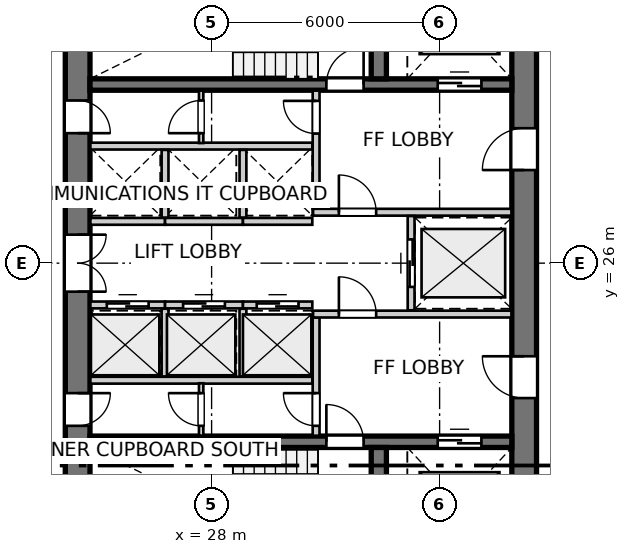
"""IFC4 building model, lengths in metres.
Left out: names, types, materials, properties, quantities, classifications, styles, units other than length and angle.
Written with IfcOpenShell. Run it as: python <this file> out.ifc"""

import sys

from ifc_helpers import new_model, si_unit, direction, frame, frame_2d, origin, place, context, subcontext, project, spatial, rectangle, extrude, source, transform, mapped, element, fill, save


model = new_model("IFC4")
c1 = context("Model", 3, precision=1e-05, world=origin(), true_north=direction((0.0, 1.0)))
c2 = subcontext(c1, "Body", "Model", "MODEL_VIEW")
j1 = project(units=[si_unit("LENGTHUNIT", "METRE"), si_unit("PLANEANGLEUNIT", "RADIAN")], contexts=[c1])
p1 = place(None, origin())
s1 = spatial("IfcSite", under=j1, at=p1, CompositionType="ELEMENT")
p2 = place(p1, origin())
s2 = spatial("IfcBuilding", under=s1, at=p2, CompositionType="ELEMENT")
p3 = place(p2, frame((0.0, 0.0, 112.0)))
s3 = spatial("IfcBuildingStorey", under=s2, at=p3, CompositionType="ELEMENT", Elevation=112.0)
p4 = place(p3, frame((24.475, 33.8, 0.0), z_axis=(0.0, 0.0, 1.0), x_axis=(0.0, -1.0, 0.0)))
e1 = element("IfcWall", 1, at=p4, inside=s3, PredefinedType="SHEAR", context=c2, shape_type="SweptSolid", body=[
    extrude(rectangle(XDim=15.6, YDim=0.65, at=frame_2d((7.8, 0.0))), origin(), (0.0, 0.0, 1.0), 2.935),
])
p5 = place(p4, frame((7.05, 0.0, 0.0)))
e2 = element("IfcOpeningElement", 2, at=p5, cuts=e1, PredefinedType="OPENING", context=c2, shape_type="SweptSolid", body=[
    extrude(rectangle(XDim=1.5, YDim=2.15, at=frame_2d((0.75, 1.075))), frame((0.0, 0.335, 0.0), z_axis=(0.0, -1.0, 0.0), x_axis=(1.0, 0.0, 0.0)), (0.0, 0.0, 1.0), 0.67),
])
p6 = place(p4, frame((3.52, 0.0, 0.0)))
e3 = element("IfcOpeningElement", 3, at=p6, cuts=e1, PredefinedType="OPENING", context=c2, shape_type="SweptSolid", body=[
    extrude(rectangle(XDim=0.86, YDim=2.05, at=frame_2d((0.43, 1.025))), frame((0.0, 0.335, 0.0), z_axis=(0.0, -1.0, 0.0), x_axis=(1.0, 0.0, 0.0)), (0.0, 0.0, 1.0), 0.67),
])
p7 = place(p4, frame((11.22, 0.0, 0.0)))
e4 = element("IfcOpeningElement", 4, at=p7, cuts=e1, PredefinedType="OPENING", context=c2, shape_type="SweptSolid", body=[
    extrude(rectangle(XDim=0.86, YDim=2.05, at=frame_2d((0.43, 1.025))), frame((0.0, 0.335, 0.0), z_axis=(0.0, -1.0, 0.0), x_axis=(1.0, 0.0, 0.0)), (0.0, 0.0, 1.0), 0.67),
])
p8 = place(p3, frame((36.225, 18.2, 0.0), z_axis=(0.0, 0.0, 1.0), x_axis=(0.0, 1.0, 0.0)))
e5 = element("IfcWall", 5, at=p8, inside=s3, PredefinedType="SHEAR", context=c2, shape_type="SweptSolid", body=[
    extrude(rectangle(XDim=15.6, YDim=0.65, at=frame_2d((7.8, 0.0))), origin(), (0.0, 0.0, 1.0), 2.935),
])
p9 = place(p8, frame((4.25, 0.0, 0.0)))
e6 = element("IfcOpeningElement", 6, at=p9, cuts=e5, PredefinedType="OPENING", context=c2, shape_type="SweptSolid", body=[
    extrude(rectangle(XDim=1.1, YDim=2.15, at=frame_2d((0.55, 1.075))), frame((0.0, 0.335, 0.0), z_axis=(0.0, -1.0, 0.0), x_axis=(1.0, 0.0, 0.0)), (0.0, 0.0, 1.0), 0.67),
])
p10 = place(p8, frame((10.25, 0.0, 0.0)))
e7 = element("IfcOpeningElement", 7, at=p10, cuts=e5, PredefinedType="OPENING", context=c2, shape_type="SweptSolid", body=[
    extrude(rectangle(XDim=1.1, YDim=2.15, at=frame_2d((0.55, 1.075))), frame((0.0, 0.335, 0.0), z_axis=(0.0, -1.0, 0.0), x_axis=(1.0, 0.0, 0.0)), (0.0, 0.0, 1.0), 0.67),
])
p11 = place(p3, frame((24.8, 21.3, 0.0), z_axis=(0.0, 0.0, 1.0), x_axis=(1.0, 0.0, 0.0)))
e8 = element("IfcWall", 8, at=p11, inside=s3, PredefinedType="SHEAR", context=c2, shape_type="SweptSolid", body=[
    extrude(rectangle(XDim=11.1, YDim=0.3, at=frame_2d((5.55, 0.0))), origin(), (0.0, 0.0, 1.0), 2.935),
])
p12 = place(p11, frame((6.22, 0.0, 0.0)))
e9 = element("IfcOpeningElement", 9, at=p12, cuts=e8, PredefinedType="OPENING", context=c2, shape_type="SweptSolid", body=[
    extrude(rectangle(XDim=0.98, YDim=2.15, at=frame_2d((0.49, 1.075))), frame((0.0, 0.16, 0.0), z_axis=(0.0, -1.0, 0.0), x_axis=(1.0, 0.0, 0.0)), (0.0, 0.0, 1.0), 0.32),
])
p13 = place(p11, frame((9.15, 0.0, 0.0)))
e10 = element("IfcOpeningElement", 10, at=p13, cuts=e8, PredefinedType="OPENING", context=c2, shape_type="SweptSolid", body=[
    extrude(rectangle(XDim=1.15, YDim=2.15, at=frame_2d((0.575, 1.075))), frame((0.0, 0.16, 0.0), z_axis=(0.0, -1.0, 0.0), x_axis=(1.0, 0.0, 0.0)), (0.0, 0.0, 1.0), 0.32),
])
p14 = place(p3, frame((32.4, 18.2, 0.0), z_axis=(0.0, 0.0, 1.0), x_axis=(0.0, 1.0, 0.0)))
e11 = element("IfcWall", 11, at=p14, inside=s3, PredefinedType="SHEAR", context=c2, shape_type="SweptSolid", body=[
    extrude(rectangle(XDim=2.95, YDim=0.4, at=frame_2d((1.475, 0.0))), origin(), (0.0, 0.0, 1.0), 2.935),
])
p15 = place(p3, frame((24.8, 30.7, 0.0), z_axis=(0.0, 0.0, 1.0), x_axis=(1.0, 0.0, 0.0)))
e12 = element("IfcWall", 12, at=p15, inside=s3, PredefinedType="SHEAR", context=c2, shape_type="SweptSolid", body=[
    extrude(rectangle(XDim=11.1, YDim=0.3, at=frame_2d((5.55, 0.0))), origin(), (0.0, 0.0, 1.0), 2.935),
])
p16 = place(p15, frame((6.22, 0.0, 0.0)))
e13 = element("IfcOpeningElement", 13, at=p16, cuts=e12, PredefinedType="OPENING", context=c2, shape_type="SweptSolid", body=[
    extrude(rectangle(XDim=0.98, YDim=2.15, at=frame_2d((0.49, 1.075))), frame((0.0, 0.16, 0.0), z_axis=(0.0, -1.0, 0.0), x_axis=(1.0, 0.0, 0.0)), (0.0, 0.0, 1.0), 0.32),
])
p17 = place(p15, frame((9.15, 0.0, 0.0)))
e14 = element("IfcOpeningElement", 14, at=p17, cuts=e12, PredefinedType="OPENING", context=c2, shape_type="SweptSolid", body=[
    extrude(rectangle(XDim=1.15, YDim=2.15, at=frame_2d((0.575, 1.075))), frame((0.0, 0.16, 0.0), z_axis=(0.0, -1.0, 0.0), x_axis=(1.0, 0.0, 0.0)), (0.0, 0.0, 1.0), 0.32),
])
p18 = place(p3, frame((32.4, 30.85, 0.0), z_axis=(0.0, 0.0, 1.0), x_axis=(0.0, 1.0, 0.0)))
e15 = element("IfcWall", 15, at=p18, inside=s3, PredefinedType="SHEAR", context=c2, shape_type="SweptSolid", body=[
    extrude(rectangle(XDim=2.95, YDim=0.4, at=frame_2d((1.475, 0.0))), origin(), (0.0, 0.0, 1.0), 2.935),
])
p19 = place(p3, frame((30.75, 21.46, 0.0), z_axis=(0.0, 0.0, 1.0), x_axis=(0.0, 1.0, 0.0)))
e16 = element("IfcWall", 16, at=p19, inside=s3, PredefinedType="PARTITIONING", context=c2, shape_type="SweptSolid", body=[
    extrude(rectangle(XDim=3.11, YDim=0.18, at=frame_2d((1.555, 0.0))), origin(), (0.0, 0.0, 1.0), 2.935),
])
p20 = place(p19, frame((0.26, 0.0, 0.0)))
e17 = element("IfcOpeningElement", 17, at=p20, cuts=e16, PredefinedType="OPENING", context=c2, shape_type="SweptSolid", body=[
    extrude(rectangle(XDim=0.86, YDim=2.05, at=frame_2d((0.43, 1.025))), frame((0.0, 0.1, 0.0), z_axis=(0.0, -1.0, 0.0), x_axis=(1.0, 0.0, 0.0)), (0.0, 0.0, 1.0), 0.2),
])
p21 = place(p3, frame((30.67, 24.66, 0.0), z_axis=(0.0, 0.0, 1.0), x_axis=(1.0, 0.0, 0.0)))
e18 = element("IfcWall", 18, at=p21, inside=s3, PredefinedType="PARTITIONING", context=c2, shape_type="SweptSolid", body=[
    extrude(rectangle(XDim=5.22, YDim=0.18, at=frame_2d((2.61, 0.0))), origin(), (0.0, 0.0, 1.0), 2.935),
])
p22 = place(p21, frame((0.68, 0.0, 0.0)))
e19 = element("IfcOpeningElement", 19, at=p22, cuts=e18, PredefinedType="OPENING", context=c2, shape_type="SweptSolid", body=[
    extrude(rectangle(XDim=0.98, YDim=2.15, at=frame_2d((0.49, 1.075))), frame((0.0, 0.1, 0.0), z_axis=(0.0, -1.0, 0.0), x_axis=(1.0, 0.0, 0.0)), (0.0, 0.0, 1.0), 0.2),
])
p23 = place(p3, frame((30.75, 27.43, 0.0), z_axis=(0.0, 0.0, 1.0), x_axis=(0.0, 1.0, 0.0)))
e20 = element("IfcWall", 20, at=p23, inside=s3, PredefinedType="PARTITIONING", context=c2, shape_type="SweptSolid", body=[
    extrude(rectangle(XDim=3.11, YDim=0.18, at=frame_2d((1.555, 0.0))), origin(), (0.0, 0.0, 1.0), 2.935),
])
p24 = place(p23, frame((1.98, 0.0, 0.0)))
e21 = element("IfcOpeningElement", 21, at=p24, cuts=e20, PredefinedType="OPENING", context=c2, shape_type="SweptSolid", body=[
    extrude(rectangle(XDim=0.86, YDim=2.05, at=frame_2d((0.43, 1.025))), frame((0.0, 0.1, 0.0), z_axis=(0.0, -1.0, 0.0), x_axis=(1.0, 0.0, 0.0)), (0.0, 0.0, 1.0), 0.2),
])
p25 = place(p3, frame((30.67, 27.34, 0.0), z_axis=(0.0, 0.0, 1.0), x_axis=(1.0, 0.0, 0.0)))
e22 = element("IfcWall", 22, at=p25, inside=s3, PredefinedType="PARTITIONING", context=c2, shape_type="SweptSolid", body=[
    extrude(rectangle(XDim=5.22, YDim=0.18, at=frame_2d((2.61, 0.0))), origin(), (0.0, 0.0, 1.0), 2.935),
])
p26 = place(p25, frame((0.68, 0.0, 0.0)))
e23 = element("IfcOpeningElement", 23, at=p26, cuts=e22, PredefinedType="OPENING", context=c2, shape_type="SweptSolid", body=[
    extrude(rectangle(XDim=0.98, YDim=2.15, at=frame_2d((0.49, 1.075))), frame((0.0, 0.1, 0.0), z_axis=(0.0, -1.0, 0.0), x_axis=(1.0, 0.0, 0.0)), (0.0, 0.0, 1.0), 0.2),
])
p27 = place(p3, frame((33.25, 24.76, 0.0), z_axis=(0.0, 0.0, 1.0), x_axis=(0.0, 1.0, 0.0)))
e24 = element("IfcWall", 24, at=p27, inside=s3, PredefinedType="PARTITIONING", context=c2, shape_type="SweptSolid", body=[
    extrude(rectangle(XDim=2.48, YDim=0.18, at=frame_2d((1.24, 0.0))), origin(), (0.0, 0.0, 1.0), 2.935),
])
p28 = place(p27, frame((0.615, 0.0, 0.0)))
e25 = element("IfcOpeningElement", 25, at=p28, cuts=e24, PredefinedType="OPENING", context=c2, shape_type="SweptSolid", body=[
    extrude(rectangle(XDim=1.25, YDim=2.15, at=frame_2d((0.625, 1.075))), frame((0.0, 0.1, 0.0), z_axis=(0.0, -1.0, 0.0), x_axis=(1.0, 0.0, 0.0)), (0.0, 0.0, 1.0), 0.2),
])
p29 = place(p3, frame((24.81, 22.92, 0.0), z_axis=(0.0, 0.0, 1.0), x_axis=(1.0, 0.0, 0.0)))
e26 = element("IfcWall", 26, at=p29, inside=s3, PredefinedType="PARTITIONING", context=c2, shape_type="SweptSolid", body=[
    extrude(rectangle(XDim=5.84, YDim=0.18, at=frame_2d((2.92, 0.0))), origin(), (0.0, 0.0, 1.0), 2.935),
])
p30 = place(p3, frame((24.81, 24.9, 0.0), z_axis=(0.0, 0.0, 1.0), x_axis=(1.0, 0.0, 0.0)))
e27 = element("IfcWall", 27, at=p30, inside=s3, PredefinedType="PARTITIONING", context=c2, shape_type="SweptSolid", body=[
    extrude(rectangle(XDim=1.965, YDim=0.18, at=frame_2d((0.982, 0.0))), origin(), (0.0, 0.0, 1.0), 2.935),
])
p31 = place(p30, frame((0.433, 0.0, 0.0)))
e28 = element("IfcOpeningElement", 28, at=p31, cuts=e27, PredefinedType="OPENING", context=c2, shape_type="SweptSolid", body=[
    extrude(rectangle(XDim=1.1, YDim=2.15, at=frame_2d((0.55, 1.075))), frame((0.0, 0.1, 0.0), z_axis=(0.0, -1.0, 0.0), x_axis=(1.0, 0.0, 0.0)), (0.0, 0.0, 1.0), 0.2),
])
p32 = place(p3, frame((26.775, 24.9, 0.0), z_axis=(0.0, 0.0, 1.0), x_axis=(1.0, 0.0, 0.0)))
e29 = element("IfcWall", 29, at=p32, inside=s3, PredefinedType="PARTITIONING", context=c2, shape_type="SweptSolid", body=[
    extrude(rectangle(XDim=2.05, YDim=0.18, at=frame_2d((1.025, 0.0))), origin(), (0.0, 0.0, 1.0), 2.935),
])
p33 = place(p32, frame((0.475, 0.0, 0.0)))
e30 = element("IfcOpeningElement", 30, at=p33, cuts=e29, PredefinedType="OPENING", context=c2, shape_type="SweptSolid", body=[
    extrude(rectangle(XDim=1.1, YDim=2.15, at=frame_2d((0.55, 1.075))), frame((0.0, 0.1, 0.0), z_axis=(0.0, -1.0, 0.0), x_axis=(1.0, 0.0, 0.0)), (0.0, 0.0, 1.0), 0.2),
])
p34 = place(p3, frame((26.775, 23.02, 0.0), z_axis=(0.0, 0.0, 1.0), x_axis=(0.0, 1.0, 0.0)))
e31 = element("IfcWall", 31, at=p34, inside=s3, PredefinedType="PARTITIONING", context=c2, shape_type="SweptSolid", body=[
    extrude(rectangle(XDim=1.78, YDim=0.18, at=frame_2d((0.89, 0.0))), origin(), (0.0, 0.0, 1.0), 2.935),
])
p35 = place(p3, frame((28.825, 24.9, 0.0), z_axis=(0.0, 0.0, 1.0), x_axis=(1.0, 0.0, 0.0)))
e32 = element("IfcWall", 32, at=p35, inside=s3, PredefinedType="PARTITIONING", context=c2, shape_type="SweptSolid", body=[
    extrude(rectangle(XDim=1.825, YDim=0.18, at=frame_2d((0.913, 0.0))), origin(), (0.0, 0.0, 1.0), 2.935),
])
p36 = place(p35, frame((0.363, 0.0, 0.0)))
e33 = element("IfcOpeningElement", 33, at=p36, cuts=e32, PredefinedType="OPENING", context=c2, shape_type="SweptSolid", body=[
    extrude(rectangle(XDim=1.1, YDim=2.15, at=frame_2d((0.55, 1.075))), frame((0.0, 0.1, 0.0), z_axis=(0.0, -1.0, 0.0), x_axis=(1.0, 0.0, 0.0)), (0.0, 0.0, 1.0), 0.2),
])
p37 = place(p3, frame((28.825, 23.02, 0.0), z_axis=(0.0, 0.0, 1.0), x_axis=(0.0, 1.0, 0.0)))
e34 = element("IfcWall", 34, at=p37, inside=s3, PredefinedType="PARTITIONING", context=c2, shape_type="SweptSolid", body=[
    extrude(rectangle(XDim=1.78, YDim=0.18, at=frame_2d((0.89, 0.0))), origin(), (0.0, 0.0, 1.0), 2.935),
])
p38 = place(p3, frame((24.81, 29.08, 0.0), z_axis=(0.0, 0.0, 1.0), x_axis=(1.0, 0.0, 0.0)))
e35 = element("IfcWall", 35, at=p38, inside=s3, PredefinedType="PARTITIONING", context=c2, shape_type="SweptSolid", body=[
    extrude(rectangle(XDim=5.84, YDim=0.18, at=frame_2d((2.92, 0.0))), origin(), (0.0, 0.0, 1.0), 2.935),
])
p39 = place(p3, frame((24.81, 27.1, 0.0), z_axis=(0.0, 0.0, 1.0), x_axis=(1.0, 0.0, 0.0)))
e36 = element("IfcWall", 36, at=p39, inside=s3, PredefinedType="PARTITIONING", context=c2, shape_type="SweptSolid", body=[
    extrude(rectangle(XDim=1.965, YDim=0.18, at=frame_2d((0.982, 0.0))), origin(), (0.0, 0.0, 1.0), 2.935),
])
p40 = place(p3, frame((26.775, 27.1, 0.0), z_axis=(0.0, 0.0, 1.0), x_axis=(1.0, 0.0, 0.0)))
e37 = element("IfcWall", 37, at=p40, inside=s3, PredefinedType="PARTITIONING", context=c2, shape_type="SweptSolid", body=[
    extrude(rectangle(XDim=2.05, YDim=0.18, at=frame_2d((1.025, 0.0))), origin(), (0.0, 0.0, 1.0), 2.935),
])
p41 = place(p3, frame((26.775, 27.2, 0.0), z_axis=(0.0, 0.0, 1.0), x_axis=(0.0, 1.0, 0.0)))
e38 = element("IfcWall", 38, at=p41, inside=s3, PredefinedType="PARTITIONING", context=c2, shape_type="SweptSolid", body=[
    extrude(rectangle(XDim=1.78, YDim=0.18, at=frame_2d((0.89, 0.0))), origin(), (0.0, 0.0, 1.0), 2.935),
])
p42 = place(p3, frame((28.825, 27.1, 0.0), z_axis=(0.0, 0.0, 1.0), x_axis=(1.0, 0.0, 0.0)))
e39 = element("IfcWall", 39, at=p42, inside=s3, PredefinedType="PARTITIONING", context=c2, shape_type="SweptSolid", body=[
    extrude(rectangle(XDim=1.825, YDim=0.18, at=frame_2d((0.913, 0.0))), origin(), (0.0, 0.0, 1.0), 2.935),
])
p43 = place(p3, frame((28.825, 27.2, 0.0), z_axis=(0.0, 0.0, 1.0), x_axis=(0.0, 1.0, 0.0)))
e40 = element("IfcWall", 40, at=p43, inside=s3, PredefinedType="PARTITIONING", context=c2, shape_type="SweptSolid", body=[
    extrude(rectangle(XDim=1.78, YDim=0.18, at=frame_2d((0.89, 0.0))), origin(), (0.0, 0.0, 1.0), 2.935),
])
p44 = place(p3, frame((27.725, 21.46, 0.0), z_axis=(0.0, 0.0, 1.0), x_axis=(0.0, 1.0, 0.0)))
e41 = element("IfcWall", 41, at=p44, inside=s3, PredefinedType="PARTITIONING", context=c2, shape_type="SweptSolid", body=[
    extrude(rectangle(XDim=1.38, YDim=0.115, at=frame_2d((0.69, 0.0))), origin(), (0.0, 0.0, 1.0), 2.935),
])
p45 = place(p44, frame((0.26, 0.0, 0.0)))
e42 = element("IfcOpeningElement", 42, at=p45, cuts=e41, PredefinedType="OPENING", context=c2, shape_type="SweptSolid", body=[
    extrude(rectangle(XDim=0.86, YDim=2.05, at=frame_2d((0.43, 1.025))), frame((0.0, 0.067, 0.0), z_axis=(0.0, -1.0, 0.0), x_axis=(1.0, 0.0, 0.0)), (0.0, 0.0, 1.0), 0.135),
])
p46 = place(p3, frame((27.725, 29.16, 0.0), z_axis=(0.0, 0.0, 1.0), x_axis=(0.0, 1.0, 0.0)))
e43 = element("IfcWall", 43, at=p46, inside=s3, PredefinedType="PARTITIONING", context=c2, shape_type="SweptSolid", body=[
    extrude(rectangle(XDim=1.38, YDim=0.115, at=frame_2d((0.69, 0.0))), origin(), (0.0, 0.0, 1.0), 2.935),
])
p47 = place(p46, frame((0.26, 0.0, 0.0)))
e44 = element("IfcOpeningElement", 44, at=p47, cuts=e43, PredefinedType="OPENING", context=c2, shape_type="SweptSolid", body=[
    extrude(rectangle(XDim=0.86, YDim=2.05, at=frame_2d((0.43, 1.025))), frame((0.0, 0.067, 0.0), z_axis=(0.0, -1.0, 0.0), x_axis=(1.0, 0.0, 0.0)), (0.0, 0.0, 1.0), 0.135),
])
m1 = source(origin(), c2, "Body", "SweptSolid", [
    extrude(rectangle(XDim=0.98, YDim=2.15, at=frame_2d((0.49, 1.075))), frame((0.0, 0.025, 0.0), z_axis=(0.0, -1.0, 0.0), x_axis=(1.0, 0.0, 0.0)), (0.0, 0.0, 1.0), 0.05),
])
p48 = place(p12, origin())
e45 = element("IfcDoor", 45, at=p48, inside=s3, OperationType="SINGLE_SWING_LEFT", PredefinedType="DOOR", context=c2, shape_type="MappedRepresentation", body=[
    mapped(m1, transform((0.0, 0.0, 0.0), x_axis=(1.0, 0.0, 0.0), y_axis=(0.0, 1.0, 0.0), z_axis=(0.0, 0.0, 1.0), scale=1.0)),
])
fill(e9, e45)
m2 = source(origin(), c2, "Body", "SweptSolid", [
    extrude(rectangle(XDim=1.15, YDim=2.15, at=frame_2d((0.575, 1.075))), frame((0.0, 0.025, 0.0), z_axis=(0.0, -1.0, 0.0), x_axis=(1.0, 0.0, 0.0)), (0.0, 0.0, 1.0), 0.05),
])
p49 = place(p13, origin())
e46 = element("IfcDoor", 46, at=p49, inside=s3, OperationType="DOUBLE_DOOR_SLIDING", PredefinedType="DOOR", context=c2, shape_type="MappedRepresentation", body=[
    mapped(m2, transform((0.0, 0.0, 0.0), x_axis=(1.0, 0.0, 0.0), y_axis=(0.0, 1.0, 0.0), z_axis=(0.0, 0.0, 1.0), scale=1.0)),
])
fill(e10, e46)
p50 = place(p16, origin())
e47 = element("IfcDoor", 47, at=p50, inside=s3, OperationType="SINGLE_SWING_RIGHT", PredefinedType="DOOR", context=c2, shape_type="MappedRepresentation", body=[
    mapped(m1, transform((0.0, 0.0, 0.0), x_axis=(1.0, 0.0, 0.0), y_axis=(0.0, 1.0, 0.0), z_axis=(0.0, 0.0, 1.0), scale=1.0)),
])
fill(e13, e47)
p51 = place(p17, origin())
e48 = element("IfcDoor", 48, at=p51, inside=s3, OperationType="DOUBLE_DOOR_SLIDING", PredefinedType="DOOR", context=c2, shape_type="MappedRepresentation", body=[
    mapped(m2, transform((0.0, 0.0, 0.0), x_axis=(1.0, 0.0, 0.0), y_axis=(0.0, 1.0, 0.0), z_axis=(0.0, 0.0, 1.0), scale=1.0)),
])
fill(e14, e48)
m3 = source(origin(), c2, "Body", "SweptSolid", [
    extrude(rectangle(XDim=1.1, YDim=2.15, at=frame_2d((0.55, 1.075))), frame((0.0, 0.025, 0.0), z_axis=(0.0, -1.0, 0.0), x_axis=(1.0, 0.0, 0.0)), (0.0, 0.0, 1.0), 0.05),
])
p52 = place(p9, origin())
e49 = element("IfcDoor", 49, at=p52, inside=s3, OperationType="SINGLE_SWING_RIGHT", PredefinedType="DOOR", context=c2, shape_type="MappedRepresentation", body=[
    mapped(m3, transform((0.0, 0.0, 0.0), x_axis=(1.0, 0.0, 0.0), y_axis=(0.0, 1.0, 0.0), z_axis=(0.0, 0.0, 1.0), scale=1.0)),
])
fill(e6, e49)
p53 = place(p10, origin())
e50 = element("IfcDoor", 50, at=p53, inside=s3, OperationType="SINGLE_SWING_LEFT", PredefinedType="DOOR", context=c2, shape_type="MappedRepresentation", body=[
    mapped(m3, transform((0.0, 0.0, 0.0), x_axis=(1.0, 0.0, 0.0), y_axis=(0.0, 1.0, 0.0), z_axis=(0.0, 0.0, 1.0), scale=1.0)),
])
fill(e7, e50)
m4 = source(origin(), c2, "Body", "SweptSolid", [
    extrude(rectangle(XDim=1.5, YDim=2.15, at=frame_2d((0.75, 1.075))), frame((0.0, 0.025, 0.0), z_axis=(0.0, -1.0, 0.0), x_axis=(1.0, 0.0, 0.0)), (0.0, 0.0, 1.0), 0.05),
])
p54 = place(p5, origin())
e51 = element("IfcDoor", 51, at=p54, inside=s3, OperationType="DOUBLE_DOOR_SINGLE_SWING", PredefinedType="DOOR", context=c2, shape_type="MappedRepresentation", body=[
    mapped(m4, transform((0.0, 0.0, 0.0), x_axis=(1.0, 0.0, 0.0), y_axis=(0.0, 1.0, 0.0), z_axis=(0.0, 0.0, 1.0), scale=1.0)),
])
fill(e2, e51)
m5 = source(origin(), c2, "Body", "SweptSolid", [
    extrude(rectangle(XDim=0.86, YDim=2.05, at=frame_2d((0.43, 1.025))), frame((0.0, 0.025, 0.0), z_axis=(0.0, -1.0, 0.0), x_axis=(1.0, 0.0, 0.0)), (0.0, 0.0, 1.0), 0.05),
])
p55 = place(p6, origin())
e52 = element("IfcDoor", 52, at=p55, inside=s3, OperationType="SINGLE_SWING_RIGHT", PredefinedType="DOOR", context=c2, shape_type="MappedRepresentation", body=[
    mapped(m5, transform((0.0, 0.0, 0.0), x_axis=(1.0, 0.0, 0.0), y_axis=(0.0, 1.0, 0.0), z_axis=(0.0, 0.0, 1.0), scale=1.0)),
])
fill(e3, e52)
p56 = place(p7, origin())
e53 = element("IfcDoor", 53, at=p56, inside=s3, OperationType="SINGLE_SWING_LEFT", PredefinedType="DOOR", context=c2, shape_type="MappedRepresentation", body=[
    mapped(m5, transform((0.0, 0.0, 0.0), x_axis=(1.0, 0.0, 0.0), y_axis=(0.0, 1.0, 0.0), z_axis=(0.0, 0.0, 1.0), scale=1.0)),
])
fill(e4, e53)
p57 = place(p20, origin())
e54 = element("IfcDoor", 54, at=p57, inside=s3, OperationType="SINGLE_SWING_RIGHT", PredefinedType="DOOR", context=c2, shape_type="MappedRepresentation", body=[
    mapped(m5, transform((0.0, 0.0, 0.0), x_axis=(1.0, 0.0, 0.0), y_axis=(0.0, 1.0, 0.0), z_axis=(0.0, 0.0, 1.0), scale=1.0)),
])
fill(e17, e54)
p58 = place(p22, origin())
e55 = element("IfcDoor", 55, at=p58, inside=s3, OperationType="SINGLE_SWING_LEFT", PredefinedType="DOOR", context=c2, shape_type="MappedRepresentation", body=[
    mapped(m1, transform((0.0, 0.0, 0.0), x_axis=(1.0, 0.0, 0.0), y_axis=(0.0, 1.0, 0.0), z_axis=(0.0, 0.0, 1.0), scale=1.0)),
])
fill(e19, e55)
p59 = place(p24, origin())
e56 = element("IfcDoor", 56, at=p59, inside=s3, OperationType="SINGLE_SWING_RIGHT", PredefinedType="DOOR", context=c2, shape_type="MappedRepresentation", body=[
    mapped(m5, transform((0.0, 0.0, 0.0), x_axis=(1.0, 0.0, 0.0), y_axis=(0.0, 1.0, 0.0), z_axis=(0.0, 0.0, 1.0), scale=1.0)),
])
fill(e21, e56)
p60 = place(p26, origin())
e57 = element("IfcDoor", 57, at=p60, inside=s3, OperationType="SINGLE_SWING_LEFT", PredefinedType="DOOR", context=c2, shape_type="MappedRepresentation", body=[
    mapped(m1, transform((0.0, 0.0, 0.0), x_axis=(1.0, 0.0, 0.0), y_axis=(0.0, 1.0, 0.0), z_axis=(0.0, 0.0, 1.0), scale=1.0)),
])
fill(e23, e57)
m6 = source(origin(), c2, "Body", "SweptSolid", [
    extrude(rectangle(XDim=1.25, YDim=2.15, at=frame_2d((0.625, 1.075))), frame((0.0, 0.025, 0.0), z_axis=(0.0, -1.0, 0.0), x_axis=(1.0, 0.0, 0.0)), (0.0, 0.0, 1.0), 0.05),
])
p61 = place(p28, origin())
e58 = element("IfcDoor", 58, at=p61, inside=s3, OperationType="DOUBLE_DOOR_SLIDING", PredefinedType="DOOR", context=c2, shape_type="MappedRepresentation", body=[
    mapped(m6, transform((0.0, 0.0, 0.0), x_axis=(1.0, 0.0, 0.0), y_axis=(0.0, 1.0, 0.0), z_axis=(0.0, 0.0, 1.0), scale=1.0)),
])
fill(e25, e58)
p62 = place(p31, origin())
e59 = element("IfcDoor", 59, at=p62, inside=s3, OperationType="DOUBLE_DOOR_SLIDING", PredefinedType="DOOR", context=c2, shape_type="MappedRepresentation", body=[
    mapped(m3, transform((0.0, 0.0, 0.0), x_axis=(1.0, 0.0, 0.0), y_axis=(0.0, 1.0, 0.0), z_axis=(0.0, 0.0, 1.0), scale=1.0)),
])
fill(e28, e59)
p63 = place(p33, origin())
e60 = element("IfcDoor", 60, at=p63, inside=s3, OperationType="DOUBLE_DOOR_SLIDING", PredefinedType="DOOR", context=c2, shape_type="MappedRepresentation", body=[
    mapped(m3, transform((0.0, 0.0, 0.0), x_axis=(1.0, 0.0, 0.0), y_axis=(0.0, 1.0, 0.0), z_axis=(0.0, 0.0, 1.0), scale=1.0)),
])
fill(e30, e60)
p64 = place(p36, origin())
e61 = element("IfcDoor", 61, at=p64, inside=s3, OperationType="DOUBLE_DOOR_SLIDING", PredefinedType="DOOR", context=c2, shape_type="MappedRepresentation", body=[
    mapped(m3, transform((0.0, 0.0, 0.0), x_axis=(1.0, 0.0, 0.0), y_axis=(0.0, 1.0, 0.0), z_axis=(0.0, 0.0, 1.0), scale=1.0)),
])
fill(e33, e61)
p65 = place(p45, origin())
e62 = element("IfcDoor", 62, at=p65, inside=s3, OperationType="SINGLE_SWING_RIGHT", PredefinedType="DOOR", context=c2, shape_type="MappedRepresentation", body=[
    mapped(m5, transform((0.0, 0.0, 0.0), x_axis=(1.0, 0.0, 0.0), y_axis=(0.0, 1.0, 0.0), z_axis=(0.0, 0.0, 1.0), scale=1.0)),
])
fill(e42, e62)
p66 = place(p47, origin())
e63 = element("IfcDoor", 63, at=p66, inside=s3, OperationType="SINGLE_SWING_LEFT", PredefinedType="DOOR", context=c2, shape_type="MappedRepresentation", body=[
    mapped(m5, transform((0.0, 0.0, 0.0), x_axis=(1.0, 0.0, 0.0), y_axis=(0.0, 1.0, 0.0), z_axis=(0.0, 0.0, 1.0), scale=1.0)),
])
fill(e44, e63)
save(model, sys.argv[1])
